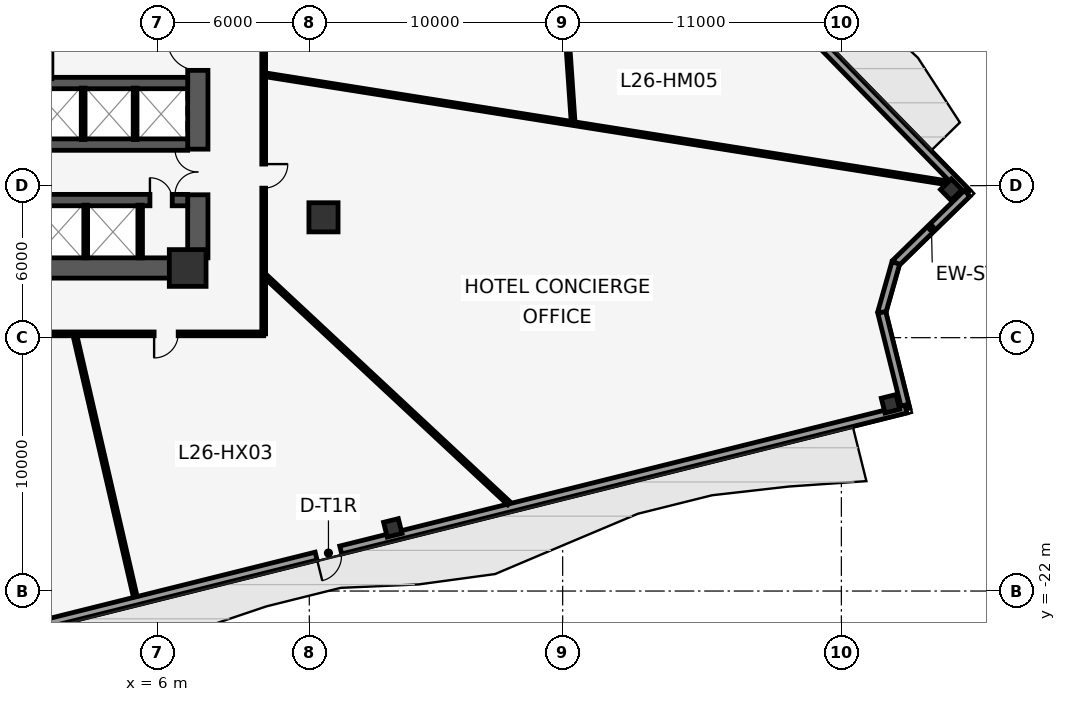
"""IFC4 building model, lengths in metres.
Left out: names, types, materials, properties, quantities, classifications, styles, units other than length and angle.
Written with IfcOpenShell. Run it as: python <this file> out.ifc"""

import sys

from ifc_helpers import new_model, si_unit, direction, frame, frame_2d, origin, origin_2d, place, context, subcontext, project, spatial, rectangle, hollow_rectangle, extrude, element, fill, save


model = new_model("IFC4")
c1 = context("Model", 3, precision=1e-05, world=origin(), true_north=direction((0.0, 1.0)))
c2 = subcontext(c1, "Body", "Model", "MODEL_VIEW")
j1 = project(units=[si_unit("LENGTHUNIT", "METRE"), si_unit("PLANEANGLEUNIT", "RADIAN")], contexts=[c1])
p1 = place(None, origin())
s1 = spatial("IfcSite", under=j1, at=p1, CompositionType="ELEMENT")
p2 = place(p1, origin())
s2 = spatial("IfcBuilding", under=s1, at=p2, CompositionType="ELEMENT")
p3 = place(p2, frame((0.0, 0.0, 115.0)))
s3 = spatial("IfcBuildingStorey", under=s2, at=p3, CompositionType="ELEMENT", Elevation=115.0)
p4 = place(p3, frame((7.6, -8.85, 0.0), z_axis=(0.0, 0.0, 1.0), x_axis=(0.0, 1.0, 0.0)))
e1 = element("IfcWall", 1, at=p4, inside=s3, PredefinedType="SHEAR", context=c2, shape_type="SweptSolid", body=[
    extrude(rectangle(XDim=8.95, YDim=0.8, at=frame_2d((4.475, 0.0))), origin(), (0.0, 0.0, 1.0), 3.75),
])
p5 = place(p4, frame((2.49, 0.0, 0.0)))
e2 = element("IfcOpeningElement", 2, at=p5, cuts=e1, PredefinedType="OPENING", context=c2, shape_type="SweptSolid", body=[
    extrude(rectangle(XDim=1.8, YDim=2.2, at=frame_2d((0.9, 1.1))), frame((0.0, 0.41, 0.0), z_axis=(0.0, -1.0, 0.0), x_axis=(1.0, 0.0, 0.0)), (0.0, 0.0, 1.0), 0.82),
])
p6 = place(p4, frame((7.4, 0.0, 0.0)))
e3 = element("IfcOpeningElement", 3, at=p6, cuts=e1, PredefinedType="OPENING", context=c2, shape_type="SweptSolid", body=[
    extrude(rectangle(XDim=1.2, YDim=2.15, at=frame_2d((0.6, 1.075))), frame((0.0, 0.41, 0.0), z_axis=(0.0, -1.0, 0.0), x_axis=(1.0, 0.0, 0.0)), (0.0, 0.0, 1.0), 0.82),
])
p7 = place(p3, frame((-7.6, -9.25, 0.0), z_axis=(0.0, 0.0, 1.0), x_axis=(1.0, 0.0, 0.0)))
e4 = element("IfcWall", 4, at=p7, inside=s3, PredefinedType="SHEAR", context=c2, shape_type="SweptSolid", body=[
    extrude(rectangle(XDim=15.2, YDim=0.8, at=frame_2d((7.6, 0.0))), origin(), (0.0, 0.0, 1.0), 3.75),
])
p8 = place(p3, frame((-7.2, -1.95, 0.0), z_axis=(0.0, 0.0, 1.0), x_axis=(1.0, 0.0, 0.0)))
e5 = element("IfcWall", 5, at=p8, inside=s3, PredefinedType="SHEAR", context=c2, shape_type="SweptSolid", body=[
    extrude(rectangle(XDim=14.4, YDim=0.45, at=frame_2d((7.2, 0.0))), origin(), (0.0, 0.0, 1.0), 3.75),
])
p9 = place(p3, frame((-7.2, -4.38, 0.0), z_axis=(0.0, 0.0, 1.0), x_axis=(1.0, 0.0, 0.0)))
e6 = element("IfcWall", 6, at=p9, inside=s3, PredefinedType="SHEAR", context=c2, shape_type="SweptSolid", body=[
    extrude(rectangle(XDim=14.4, YDim=0.45, at=frame_2d((7.2, 0.0))), origin(), (0.0, 0.0, 1.0), 3.75),
])
p10 = place(p9, frame((0.5, 0.0, 0.0)))
e7 = element("IfcOpeningElement", 7, at=p10, cuts=e6, PredefinedType="OPENING", context=c2, shape_type="SweptSolid", body=[
    extrude(rectangle(XDim=1.1, YDim=2.2, at=frame_2d((0.55, 1.1))), frame((0.0, 0.235, 0.0), z_axis=(0.0, -1.0, 0.0), x_axis=(1.0, 0.0, 0.0)), (0.0, 0.0, 1.0), 0.47),
])
p11 = place(p9, frame((2.55, 0.0, 0.0)))
e8 = element("IfcOpeningElement", 8, at=p11, cuts=e6, PredefinedType="OPENING", context=c2, shape_type="SweptSolid", body=[
    extrude(rectangle(XDim=1.1, YDim=2.2, at=frame_2d((0.55, 1.1))), frame((0.0, 0.235, 0.0), z_axis=(0.0, -1.0, 0.0), x_axis=(1.0, 0.0, 0.0)), (0.0, 0.0, 1.0), 0.47),
])
p12 = place(p9, frame((4.6, 0.0, 0.0)))
e9 = element("IfcOpeningElement", 9, at=p12, cuts=e6, PredefinedType="OPENING", context=c2, shape_type="SweptSolid", body=[
    extrude(rectangle(XDim=1.1, YDim=2.2, at=frame_2d((0.55, 1.1))), frame((0.0, 0.235, 0.0), z_axis=(0.0, -1.0, 0.0), x_axis=(1.0, 0.0, 0.0)), (0.0, 0.0, 1.0), 0.47),
])
p13 = place(p9, frame((6.3, 0.0, 0.0)))
e10 = element("IfcOpeningElement", 10, at=p13, cuts=e6, PredefinedType="OPENING", context=c2, shape_type="SweptSolid", body=[
    extrude(rectangle(XDim=1.1, YDim=2.2, at=frame_2d((0.55, 1.1))), frame((0.0, 0.235, 0.0), z_axis=(0.0, -1.0, 0.0), x_axis=(1.0, 0.0, 0.0)), (0.0, 0.0, 1.0), 0.47),
])
p14 = place(p3, frame((-7.2, -6.57, 0.0), z_axis=(0.0, 0.0, 1.0), x_axis=(1.0, 0.0, 0.0)))
e11 = element("IfcWall", 11, at=p14, inside=s3, PredefinedType="SHEAR", context=c2, shape_type="SweptSolid", body=[
    extrude(rectangle(XDim=14.4, YDim=0.45, at=frame_2d((7.2, 0.0))), origin(), (0.0, 0.0, 1.0), 3.75),
])
p15 = place(p14, frame((12.91, 0.0, 0.0)))
e12 = element("IfcOpeningElement", 12, at=p15, cuts=e11, PredefinedType="OPENING", context=c2, shape_type="SweptSolid", body=[
    extrude(rectangle(XDim=0.88, YDim=2.15, at=frame_2d((0.44, 1.075))), frame((0.0, 0.235, 0.0), z_axis=(0.0, -1.0, 0.0), x_axis=(1.0, 0.0, 0.0)), (0.0, 0.0, 1.0), 0.47),
])
p16 = place(p3, frame((7.2, -9.25, 0.0), z_axis=(0.0, 0.0, 1.0), x_axis=(1.0, 0.0, 0.0)))
e13 = element("IfcColumn", 13, at=p16, inside=s3, PredefinedType="COLUMN", context=c2, shape_type="SweptSolid", body=[
    extrude(rectangle(XDim=1.45, YDim=1.45, at=origin_2d()), origin(), (0.0, 0.0, 1.0), 4.0),
])
p17 = place(p3, frame((12.56, -7.25, 0.0), z_axis=(0.0, 0.0, 1.0), x_axis=(1.0, 0.0, 0.0)))
e14 = element("IfcColumn", 14, at=p17, inside=s3, PredefinedType="COLUMN", context=c2, shape_type="SweptSolid", body=[
    extrude(rectangle(XDim=1.15, YDim=1.15, at=origin_2d()), origin(), (0.0, 0.0, 1.0), 4.0),
])
for number, where, z_axis, x_axis in (
    (15, (15.296, -19.507, 0.0), (0.0, 0.0, 1.0), (0.97, 0.242, 0.0)),
    (16, (34.939, -14.609, 0.0), (0.0, 0.0, 1.0), (0.97, 0.242, 0.0)),
    (17, (37.337, -6.16, 0.0), (0.0, 0.0, 1.0), (-0.699, 0.716, 0.0)),
):
    element("IfcColumn", number, at=place(p3, frame(where, z_axis=z_axis, x_axis=x_axis)), inside=s3, PredefinedType="COLUMN", context=c2, shape_type="SweptSolid", body=[
        extrude(hollow_rectangle(XDim=0.6, YDim=0.6, WallThickness=0.04, at=origin_2d()), origin(), (0.0, 0.0, 1.0), 4.0),
    ])
p18 = place(p3, frame((-4.698, 37.402, 0.0), z_axis=(0.0, 0.0, 1.0), x_axis=(0.698490621109, -0.715619208954, 0.0)))
e18 = element("IfcWall", 18, at=p18, inside=s3, PredefinedType="STANDARD", context=c2, shape_type="SweptSolid", body=[
    extrude(rectangle(XDim=61.076, YDim=0.32, at=frame_2d((30.538, 0.0))), origin(), (0.0, 0.0, 1.0), 3.75),
])
p19 = place(p18, frame((30.038, 0.0, 0.0)))
e19 = element("IfcOpeningElement", 19, at=p19, cuts=e18, PredefinedType="OPENING", context=c2, shape_type="SweptSolid", body=[
    extrude(rectangle(XDim=1.0, YDim=2.15, at=frame_2d((0.5, 1.075))), frame((0.0, 0.17, 0.0), z_axis=(0.0, -1.0, 0.0), x_axis=(1.0, 0.0, 0.0)), (0.0, 0.0, 1.0), 0.34),
])
p20 = place(p3, frame((37.963, -6.305, 0.0), z_axis=(0.0, 0.0, 1.0), x_axis=(-0.71562223009, -0.698487525873, 0.0)))
e20 = element("IfcWall", 20, at=p20, inside=s3, PredefinedType="STANDARD", context=c2, shape_type="SweptSolid", body=[
    extrude(rectangle(XDim=3.933, YDim=0.32, at=frame_2d((1.966, 0.0))), origin(), (0.0, 0.0, 1.0), 3.75),
])
p21 = place(p3, frame((35.148, -9.052, 0.0), z_axis=(0.0, 0.0, 1.0), x_axis=(-0.27306692697, -0.961995038134, 0.0)))
e21 = element("IfcWall", 21, at=p21, inside=s3, PredefinedType="STANDARD", context=c2, shape_type="SweptSolid", body=[
    extrude(rectangle(XDim=2.028, YDim=0.32, at=frame_2d((1.014, 0.0))), origin(), (0.0, 0.0, 1.0), 3.75),
])
p22 = place(p3, frame((34.595, -11.003, 0.0), z_axis=(0.0, 0.0, 1.0), x_axis=(0.241936662418, -0.970292044375, 0.0)))
e22 = element("IfcWall", 22, at=p22, inside=s3, PredefinedType="STANDARD", context=c2, shape_type="SweptSolid", body=[
    extrude(rectangle(XDim=3.933, YDim=0.32, at=frame_2d((1.966, 0.0))), origin(), (0.0, 0.0, 1.0), 3.75),
])
p23 = place(p3, frame((35.546, -14.818, 0.0), z_axis=(0.0, 0.0, 1.0), x_axis=(-0.970295883146, -0.241921266428, 0.0)))
e23 = element("IfcWall", 23, at=p23, inside=s3, PredefinedType="STANDARD", context=c2, shape_type="SweptSolid", body=[
    extrude(rectangle(XDim=61.811, YDim=0.32, at=frame_2d((30.905, 0.0))), origin(), (0.0, 0.0, 1.0), 3.75),
])
p24 = place(p23, frame((22.988, 0.0, 0.0)))
e24 = element("IfcOpeningElement", 24, at=p24, cuts=e23, PredefinedType="OPENING", context=c2, shape_type="SweptSolid", body=[
    extrude(rectangle(XDim=1.0, YDim=2.15, at=frame_2d((0.5, 1.075))), frame((0.0, 0.17, 0.0), z_axis=(0.0, -1.0, 0.0), x_axis=(1.0, 0.0, 0.0)), (0.0, 0.0, 1.0), 0.34),
])
for number, where, z_axis, x_axis in (
    (25, (3.075, -4.18, 0.0), (0.0, 0.0, 1.0), (0.0, 1.0, 0.0)),
    (26, (5.125, -4.18, 0.0), (0.0, 0.0, 1.0), (0.0, 1.0, 0.0)),
):
    element("IfcWall", number, at=place(p3, frame(where, z_axis=z_axis, x_axis=x_axis)), inside=s3, PredefinedType="PARTITIONING", context=c2, shape_type="SweptSolid", body=[
        extrude(rectangle(XDim=2.03, YDim=0.15, at=frame_2d((1.015, 0.0))), origin(), (0.0, 0.0, 1.0), 3.75),
    ])
p25 = place(p3, frame((3.175, -8.85, 0.0), z_axis=(0.0, 0.0, 1.0), x_axis=(0.0, 1.0, 0.0)))
e27 = element("IfcWall", 27, at=p25, inside=s3, PredefinedType="PARTITIONING", context=c2, shape_type="SweptSolid", body=[
    extrude(rectangle(XDim=2.08, YDim=0.15, at=frame_2d((1.04, 0.0))), origin(), (0.0, 0.0, 1.0), 3.75),
])
p26 = place(p3, frame((5.325, -8.85, 0.0), z_axis=(0.0, 0.0, 1.0), x_axis=(0.0, 1.0, 0.0)))
e28 = element("IfcWall", 28, at=p26, inside=s3, PredefinedType="PARTITIONING", context=c2, shape_type="SweptSolid", body=[
    extrude(rectangle(XDim=2.08, YDim=0.18, at=frame_2d((1.04, 0.0))), origin(), (0.0, 0.0, 1.0), 3.75),
])
p27 = place(p3, frame((10.2, 12.15, 0.0), z_axis=(0.0, 0.0, 1.0), x_axis=(0.0, -1.0, 0.0)))
e29 = element("IfcWall", 29, at=p27, inside=s3, PredefinedType="PARTITIONING", context=c2, shape_type="SweptSolid", body=[
    extrude(rectangle(XDim=24.0, YDim=0.15, at=frame_2d((12.0, 0.0))), origin(), (0.0, 0.0, 1.0), 3.75),
])
p28 = place(p27, frame((17.299, 0.0, 0.0)))
e30 = element("IfcOpeningElement", 30, at=p28, cuts=e29, PredefinedType="OPENING", context=c2, shape_type="SweptSolid", body=[
    extrude(rectangle(XDim=0.95, YDim=2.15, at=frame_2d((0.475, 1.075))), frame((0.0, 0.085, 0.0), z_axis=(0.0, -1.0, 0.0), x_axis=(1.0, 0.0, 0.0)), (0.0, 0.0, 1.0), 0.17),
])
p29 = place(p27, frame((10.092, 0.0, 0.0)))
e31 = element("IfcOpeningElement", 31, at=p29, cuts=e29, PredefinedType="OPENING", context=c2, shape_type="SweptSolid", body=[
    extrude(rectangle(XDim=0.95, YDim=2.15, at=frame_2d((0.475, 1.075))), frame((0.0, 0.085, 0.0), z_axis=(0.0, -1.0, 0.0), x_axis=(1.0, 0.0, 0.0)), (0.0, 0.0, 1.0), 0.17),
])
p30 = place(p27, frame((3.327, 0.0, 0.0)))
e32 = element("IfcOpeningElement", 32, at=p30, cuts=e29, PredefinedType="OPENING", context=c2, shape_type="SweptSolid", body=[
    extrude(rectangle(XDim=0.95, YDim=2.15, at=frame_2d((0.475, 1.075))), frame((0.0, 0.085, 0.0), z_axis=(0.0, -1.0, 0.0), x_axis=(1.0, 0.0, 0.0)), (0.0, 0.0, 1.0), 0.17),
])
p31 = place(p3, frame((10.2, -11.85, 0.0), z_axis=(0.0, 0.0, 1.0), x_axis=(-1.0, 0.0, 0.0)))
e33 = element("IfcWall", 33, at=p31, inside=s3, PredefinedType="PARTITIONING", context=c2, shape_type="SweptSolid", body=[
    extrude(rectangle(XDim=20.4, YDim=0.15, at=frame_2d((10.2, 0.0))), origin(), (0.0, 0.0, 1.0), 3.75),
])
p32 = place(p31, frame((16.522, 0.0, 0.0)))
e34 = element("IfcOpeningElement", 34, at=p32, cuts=e33, PredefinedType="OPENING", context=c2, shape_type="SweptSolid", body=[
    extrude(rectangle(XDim=0.95, YDim=2.15, at=frame_2d((0.475, 1.075))), frame((0.0, 0.085, 0.0), z_axis=(0.0, -1.0, 0.0), x_axis=(1.0, 0.0, 0.0)), (0.0, 0.0, 1.0), 0.17),
])
p33 = place(p31, frame((10.172, 0.0, 0.0)))
e35 = element("IfcOpeningElement", 35, at=p33, cuts=e33, PredefinedType="OPENING", context=c2, shape_type="SweptSolid", body=[
    extrude(rectangle(XDim=0.95, YDim=2.15, at=frame_2d((0.475, 1.075))), frame((0.0, 0.085, 0.0), z_axis=(0.0, -1.0, 0.0), x_axis=(1.0, 0.0, 0.0)), (0.0, 0.0, 1.0), 0.17),
])
p34 = place(p31, frame((3.375, 0.0, 0.0)))
e36 = element("IfcOpeningElement", 36, at=p34, cuts=e33, PredefinedType="OPENING", context=c2, shape_type="SweptSolid", body=[
    extrude(rectangle(XDim=0.95, YDim=2.15, at=frame_2d((0.475, 1.075))), frame((0.0, 0.085, 0.0), z_axis=(0.0, -1.0, 0.0), x_axis=(1.0, 0.0, 0.0)), (0.0, 0.0, 1.0), 0.17),
])
p35 = place(p3, frame((2.76, -11.955, 0.0), z_axis=(0.0, 0.0, 1.0), x_axis=(0.224945811952, -0.974371275072, 0.0)))
e37 = element("IfcWall", 37, at=p35, inside=s3, PredefinedType="PARTITIONING", context=c2, shape_type="SweptSolid", body=[
    extrude(rectangle(XDim=10.536, YDim=0.15, at=frame_2d((5.268, 0.0))), origin(), (0.0, 0.0, 1.0), 3.75),
])
p36 = place(p3, frame((10.305, -9.61, 0.0), z_axis=(0.0, 0.0, 1.0), x_axis=(0.731362621349, -0.681988794698, 0.0)))
e38 = element("IfcWall", 38, at=p36, inside=s3, PredefinedType="PARTITIONING", context=c2, shape_type="SweptSolid", body=[
    extrude(rectangle(XDim=13.099, YDim=0.15, at=frame_2d((6.549, 0.0))), origin(), (0.0, 0.0, 1.0), 3.75),
])
p37 = place(p3, frame((10.305, -1.632, 0.0), z_axis=(0.0, 0.0, 1.0), x_axis=(0.987688570565, -0.156433013064, 0.0)))
e39 = element("IfcWall", 39, at=p37, inside=s3, PredefinedType="PARTITIONING", context=c2, shape_type="SweptSolid", body=[
    extrude(rectangle(XDim=27.368, YDim=0.15, at=frame_2d((13.684, 0.0))), origin(), (0.0, 0.0, 1.0), 3.75),
])
p38 = place(p3, frame((22.415, -3.525, 0.0), z_axis=(0.0, 0.0, 1.0), x_axis=(-0.068270897284, 0.997666820429, 0.0)))
e40 = element("IfcWall", 40, at=p38, inside=s3, PredefinedType="PARTITIONING", context=c2, shape_type="SweptSolid", body=[
    extrude(rectangle(XDim=13.55, YDim=0.15, at=frame_2d((6.775, 0.0))), origin(), (0.0, 0.0, 1.0), 3.75),
])
p39 = place(p38, frame((6.325, 0.0, 0.0)))
e41 = element("IfcOpeningElement", 41, at=p39, cuts=e40, PredefinedType="OPENING", context=c2, shape_type="SweptSolid", body=[
    extrude(rectangle(XDim=0.9, YDim=2.1, at=frame_2d((0.45, 1.05))), frame((0.0, 0.085, 0.0), z_axis=(0.0, -1.0, 0.0), x_axis=(1.0, 0.0, 0.0)), (0.0, 0.0, 1.0), 0.17),
])
p40 = place(p24, origin())
e42 = element("IfcDoor", 42, at=p40, inside=s3, OperationType="SINGLE_SWING_RIGHT", PredefinedType="DOOR", context=c2, shape_type="SweptSolid", body=[
    extrude(rectangle(XDim=1.0, YDim=2.15, at=frame_2d((0.5, 1.075))), frame((0.0, 0.025, 0.0), z_axis=(0.0, -1.0, 0.0), x_axis=(1.0, 0.0, 0.0)), (0.0, 0.0, 1.0), 0.05),
])
fill(e24, e42)
p41 = place(p5, origin())
e43 = element("IfcDoor", 43, at=p41, inside=s3, OperationType="DOUBLE_DOOR_SINGLE_SWING", PredefinedType="DOOR", context=c2, shape_type="SweptSolid", body=[
    extrude(rectangle(XDim=1.8, YDim=2.2, at=frame_2d((0.9, 1.1))), frame((0.0, 0.025, 0.0), z_axis=(0.0, -1.0, 0.0), x_axis=(1.0, 0.0, 0.0)), (0.0, 0.0, 1.0), 0.05),
])
fill(e2, e43)
p42 = place(p6, origin())
e44 = element("IfcDoor", 44, at=p42, inside=s3, OperationType="SINGLE_SWING_RIGHT", PredefinedType="DOOR", context=c2, shape_type="SweptSolid", body=[
    extrude(rectangle(XDim=1.2, YDim=2.15, at=frame_2d((0.6, 1.075))), frame((0.0, 0.025, 0.0), z_axis=(0.0, -1.0, 0.0), x_axis=(1.0, 0.0, 0.0)), (0.0, 0.0, 1.0), 0.05),
])
fill(e3, e44)
p43 = place(p15, origin())
e45 = element("IfcDoor", 45, at=p43, inside=s3, OperationType="SINGLE_SWING_LEFT", PredefinedType="DOOR", context=c2, shape_type="SweptSolid", body=[
    extrude(rectangle(XDim=0.88, YDim=2.15, at=frame_2d((0.44, 1.075))), frame((0.0, 0.025, 0.0), z_axis=(0.0, -1.0, 0.0), x_axis=(1.0, 0.0, 0.0)), (0.0, 0.0, 1.0), 0.05),
])
fill(e12, e45)
p44 = place(p34, origin())
e46 = element("IfcDoor", 46, at=p44, inside=s3, OperationType="SINGLE_SWING_RIGHT", PredefinedType="DOOR", context=c2, shape_type="SweptSolid", body=[
    extrude(rectangle(XDim=0.95, YDim=2.15, at=frame_2d((0.475, 1.075))), frame((0.0, 0.025, 0.0), z_axis=(0.0, -1.0, 0.0), x_axis=(1.0, 0.0, 0.0)), (0.0, 0.0, 1.0), 0.05),
])
fill(e36, e46)
p45 = place(p28, origin())
e47 = element("IfcDoor", 47, at=p45, inside=s3, OperationType="SINGLE_SWING_LEFT", PredefinedType="DOOR", context=c2, shape_type="SweptSolid", body=[
    extrude(rectangle(XDim=0.95, YDim=2.15, at=frame_2d((0.475, 1.075))), frame((0.0, 0.025, 0.0), z_axis=(0.0, -1.0, 0.0), x_axis=(1.0, 0.0, 0.0)), (0.0, 0.0, 1.0), 0.05),
])
fill(e30, e47)
save(model, sys.argv[1])
